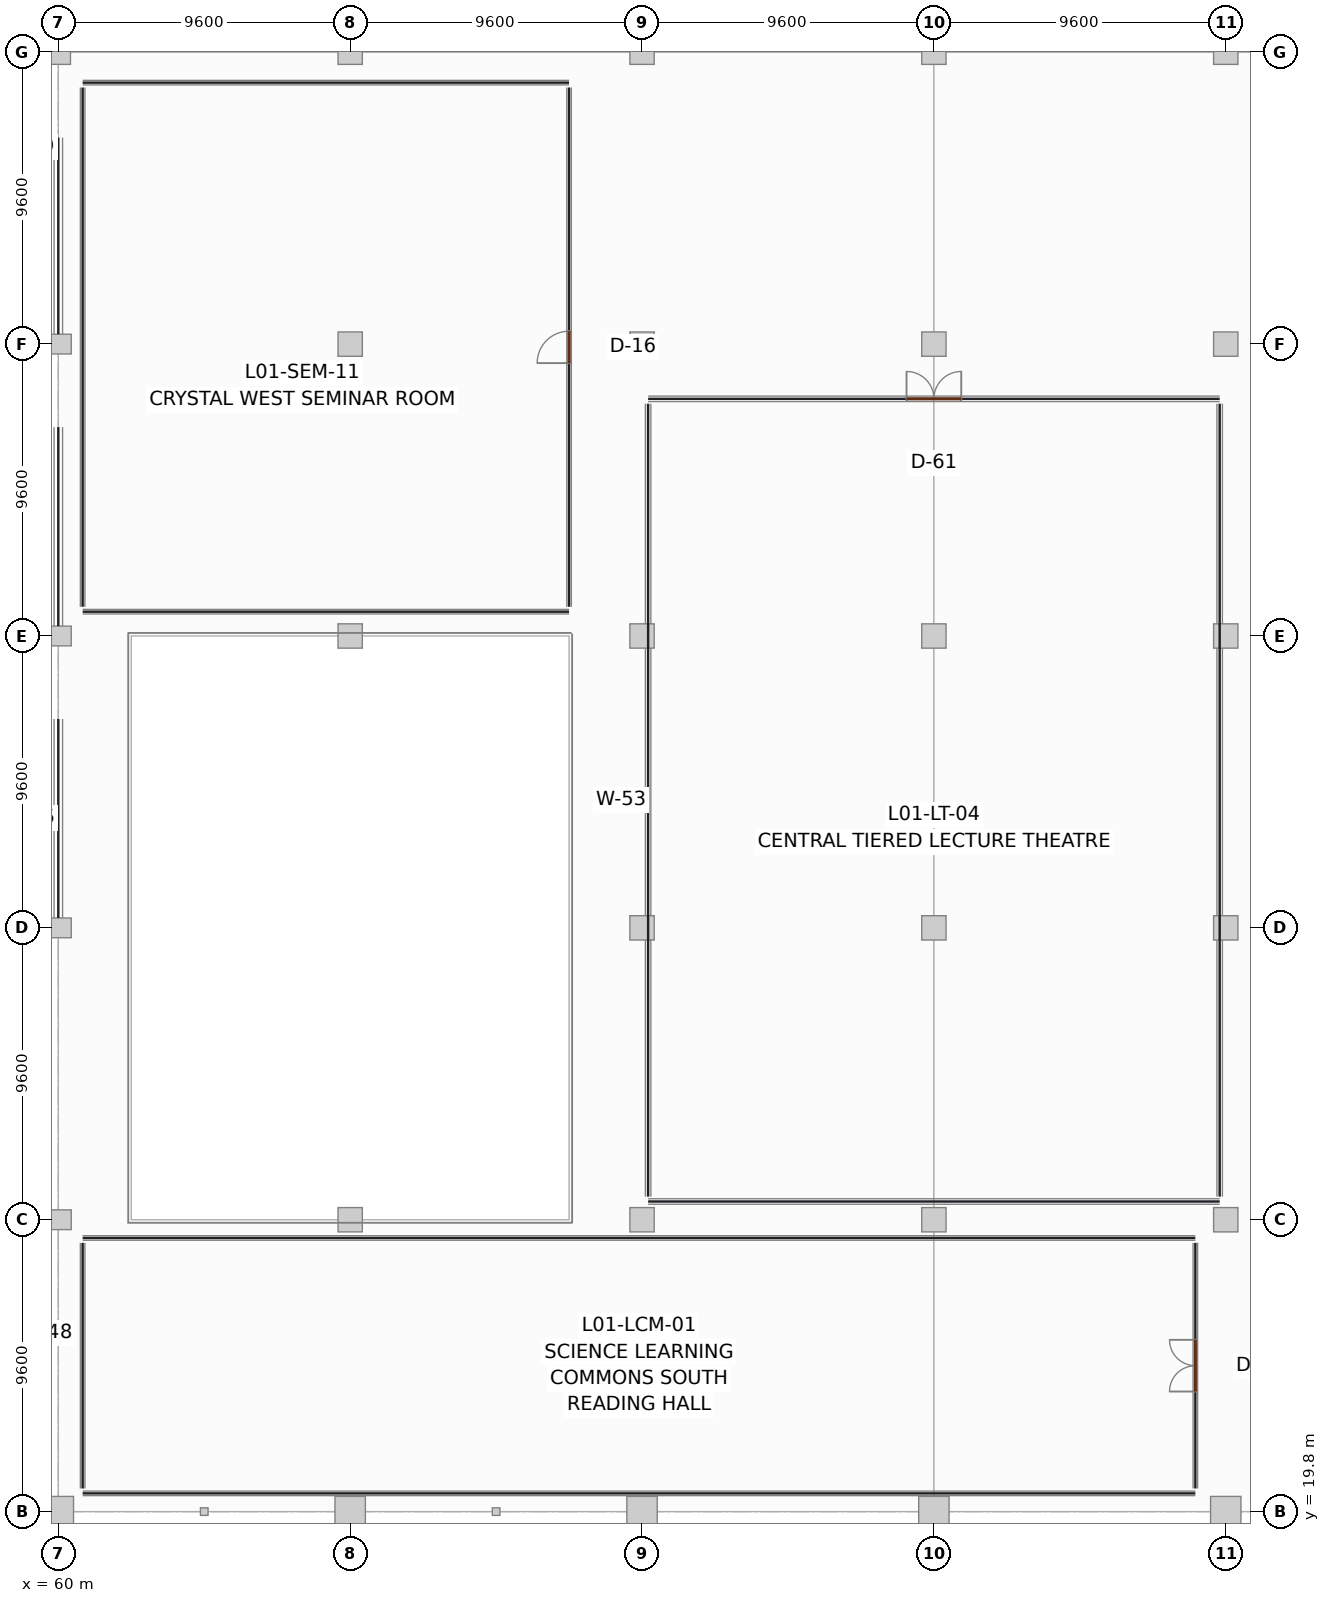
"""IFC4 building model, lengths in metres.
Left out: names, types, materials, properties, quantities, classifications, styles, units other than length and angle.
Written with IfcOpenShell. Run it as: python <this file> out.ifc"""

import sys

from ifc_helpers import new_model, si_unit, direction, frame, frame_2d, origin, origin_2d, place, context, subcontext, project, spatial, rectangle, hollow_rectangle, extrude, element, fill, save


model = new_model("IFC4")
c1 = context("Model", 3, precision=1e-05, world=origin(), true_north=direction((0.0, 1.0)))
c2 = subcontext(c1, "Body", "Model", "MODEL_VIEW")
j1 = project(units=[si_unit("LENGTHUNIT", "METRE"), si_unit("PLANEANGLEUNIT", "RADIAN")], contexts=[c1])
p1 = place(None, origin())
s1 = spatial("IfcSite", under=j1, at=p1, CompositionType="ELEMENT")
p2 = place(p1, origin())
s2 = spatial("IfcBuilding", under=s1, at=p2, CompositionType="ELEMENT")
p3 = place(p2, frame((0.0, 0.0, 5.4)))
s3 = spatial("IfcBuildingStorey", under=s2, at=p3, CompositionType="ELEMENT", Elevation=5.4)
p4 = place(p3, frame((60.0, 19.8, 0.0), z_axis=(0.0, 0.0, 1.0), x_axis=(1.0, 0.0, 0.0)))
e1 = element("IfcColumn", 1, at=p4, inside=s3, PredefinedType="COLUMN", context=c2, shape_type="SweptSolid", body=[
    extrude(rectangle(XDim=1.0, YDim=1.0, at=origin_2d()), origin(), (0.0, 0.0, 1.0), 4.18),
])
for number, where, z_axis, x_axis in (
    (2, (60.0, 29.4, 0.0), (0.0, 0.0, 1.0), (1.0, 0.0, 0.0)),
    (3, (60.0, 39.0, 0.0), (0.0, 0.0, 1.0), (1.0, 0.0, 0.0)),
    (4, (60.0, 48.6, 0.0), (0.0, 0.0, 1.0), (1.0, 0.0, 0.0)),
    (5, (60.0, 58.2, 0.0), (0.0, 0.0, 1.0), (1.0, 0.0, 0.0)),
):
    element("IfcColumn", number, at=place(p3, frame(where, z_axis=z_axis, x_axis=x_axis)), inside=s3, PredefinedType="COLUMN", context=c2, shape_type="SweptSolid", body=[
        extrude(rectangle(XDim=0.85, YDim=0.65, at=origin_2d()), origin(), (0.0, 0.0, 1.0), 4.18),
    ])
p5 = place(p3, frame((60.0, 67.8, 0.0), z_axis=(0.0, 0.0, 1.0), x_axis=(1.0, 0.0, 0.0)))
e6 = element("IfcColumn", 6, at=p5, inside=s3, PredefinedType="COLUMN", context=c2, shape_type="SweptSolid", body=[
    extrude(rectangle(XDim=0.8, YDim=0.8, at=origin_2d()), origin(), (0.0, 0.0, 1.0), 4.18),
])
p6 = place(p3, frame((69.6, 19.8, 0.0), z_axis=(0.0, 0.0, 1.0), x_axis=(1.0, 0.0, 0.0)))
e7 = element("IfcColumn", 7, at=p6, inside=s3, PredefinedType="COLUMN", context=c2, shape_type="SweptSolid", body=[
    extrude(rectangle(XDim=1.0, YDim=1.0, at=origin_2d()), origin(), (0.0, 0.0, 1.0), 4.18),
])
for number, where, z_axis, x_axis in (
    (8, (69.6, 29.4, 0.0), (0.0, 0.0, 1.0), (1.0, 0.0, 0.0)),
    (9, (69.6, 48.6, 0.0), (0.0, 0.0, 1.0), (1.0, 0.0, 0.0)),
    (10, (69.6, 58.2, 0.0), (0.0, 0.0, 1.0), (1.0, 0.0, 0.0)),
    (11, (69.6, 67.8, 0.0), (0.0, 0.0, 1.0), (1.0, 0.0, 0.0)),
):
    element("IfcColumn", number, at=place(p3, frame(where, z_axis=z_axis, x_axis=x_axis)), inside=s3, PredefinedType="COLUMN", context=c2, shape_type="SweptSolid", body=[
        extrude(rectangle(XDim=0.8, YDim=0.8, at=origin_2d()), origin(), (0.0, 0.0, 1.0), 4.18),
    ])
p7 = place(p3, frame((79.2, 19.8, 0.0), z_axis=(0.0, 0.0, 1.0), x_axis=(1.0, 0.0, 0.0)))
e12 = element("IfcColumn", 12, at=p7, inside=s3, PredefinedType="COLUMN", context=c2, shape_type="SweptSolid", body=[
    extrude(rectangle(XDim=1.0, YDim=1.0, at=origin_2d()), origin(), (0.0, 0.0, 1.0), 4.18),
])
for number, where, z_axis, x_axis in (
    (13, (79.2, 29.4, 0.0), (0.0, 0.0, 1.0), (1.0, 0.0, 0.0)),
    (14, (79.2, 39.0, 0.0), (0.0, 0.0, 1.0), (1.0, 0.0, 0.0)),
    (15, (79.2, 48.6, 0.0), (0.0, 0.0, 1.0), (1.0, 0.0, 0.0)),
    (16, (79.2, 58.2, 0.0), (0.0, 0.0, 1.0), (1.0, 0.0, 0.0)),
    (17, (79.2, 67.8, 0.0), (0.0, 0.0, 1.0), (1.0, 0.0, 0.0)),
):
    element("IfcColumn", number, at=place(p3, frame(where, z_axis=z_axis, x_axis=x_axis)), inside=s3, PredefinedType="COLUMN", context=c2, shape_type="SweptSolid", body=[
        extrude(rectangle(XDim=0.8, YDim=0.8, at=origin_2d()), origin(), (0.0, 0.0, 1.0), 4.18),
    ])
p8 = place(p3, frame((88.8, 19.8, 0.0), z_axis=(0.0, 0.0, 1.0), x_axis=(1.0, 0.0, 0.0)))
e18 = element("IfcColumn", 18, at=p8, inside=s3, PredefinedType="COLUMN", context=c2, shape_type="SweptSolid", body=[
    extrude(rectangle(XDim=1.0, YDim=1.0, at=origin_2d()), origin(), (0.0, 0.0, 1.0), 4.18),
])
for number, where, z_axis, x_axis in (
    (19, (88.8, 29.4, 0.0), (0.0, 0.0, 1.0), (1.0, 0.0, 0.0)),
    (20, (88.8, 39.0, 0.0), (0.0, 0.0, 1.0), (1.0, 0.0, 0.0)),
    (21, (88.8, 48.6, 0.0), (0.0, 0.0, 1.0), (1.0, 0.0, 0.0)),
    (22, (88.8, 58.2, 0.0), (0.0, 0.0, 1.0), (1.0, 0.0, 0.0)),
    (23, (88.8, 67.8, 0.0), (0.0, 0.0, 1.0), (1.0, 0.0, 0.0)),
):
    element("IfcColumn", number, at=place(p3, frame(where, z_axis=z_axis, x_axis=x_axis)), inside=s3, PredefinedType="COLUMN", context=c2, shape_type="SweptSolid", body=[
        extrude(rectangle(XDim=0.8, YDim=0.8, at=origin_2d()), origin(), (0.0, 0.0, 1.0), 4.18),
    ])
p9 = place(p3, frame((98.4, 19.8, 0.0), z_axis=(0.0, 0.0, 1.0), x_axis=(1.0, 0.0, 0.0)))
e24 = element("IfcColumn", 24, at=p9, inside=s3, PredefinedType="COLUMN", context=c2, shape_type="SweptSolid", body=[
    extrude(rectangle(XDim=1.0, YDim=1.0, at=origin_2d()), origin(), (0.0, 0.0, 1.0), 4.18),
])
for number, where, z_axis, x_axis in (
    (25, (98.4, 29.4, 0.0), (0.0, 0.0, 1.0), (1.0, 0.0, 0.0)),
    (26, (98.4, 39.0, 0.0), (0.0, 0.0, 1.0), (1.0, 0.0, 0.0)),
    (27, (98.4, 48.6, 0.0), (0.0, 0.0, 1.0), (1.0, 0.0, 0.0)),
    (28, (98.4, 58.2, 0.0), (0.0, 0.0, 1.0), (1.0, 0.0, 0.0)),
    (29, (98.4, 67.8, 0.0), (0.0, 0.0, 1.0), (1.0, 0.0, 0.0)),
):
    element("IfcColumn", number, at=place(p3, frame(where, z_axis=z_axis, x_axis=x_axis)), inside=s3, PredefinedType="COLUMN", context=c2, shape_type="SweptSolid", body=[
        extrude(rectangle(XDim=0.8, YDim=0.8, at=origin_2d()), origin(), (0.0, 0.0, 1.0), 4.18),
    ])
for number, where, z_axis, x_axis in (
    (30, (64.8, 19.8, 0.0), (0.0, 0.0, 1.0), (1.0, 0.0, 0.0)),
    (31, (74.4, 19.8, 0.0), (0.0, 0.0, 1.0), (1.0, 0.0, 0.0)),
):
    element("IfcColumn", number, at=place(p3, frame(where, z_axis=z_axis, x_axis=x_axis)), inside=s3, PredefinedType="COLUMN", context=c2, shape_type="SweptSolid", body=[
        extrude(hollow_rectangle(XDim=0.25, YDim=0.25, WallThickness=0.012, at=origin_2d()), origin(), (0.0, 0.0, 1.0), 4.18),
    ])
for number, where, z_axis, x_axis in (
    (32, (60.0, 39.327, 0.0), (0.0, 0.0, 1.0), (0.0, 1.0, 0.0)),
    (33, (60.0, 48.927, 0.0), (0.0, 0.0, 1.0), (0.0, 1.0, 0.0)),
):
    element("IfcWall", number, at=place(p3, frame(where, z_axis=z_axis, x_axis=x_axis)), inside=s3, PredefinedType="SOLIDWALL", context=c2, shape_type="SweptSolid", body=[
        extrude(rectangle(XDim=6.542, YDim=0.28, at=frame_2d((3.271, 0.0))), origin(), (0.0, 0.0, 1.0), 3.38),
    ])
p10 = place(p3, frame((60.0, 58.527, 0.0), z_axis=(0.0, 0.0, 1.0), x_axis=(0.0, 1.0, 0.0)))
e34 = element("IfcWall", 34, at=p10, inside=s3, PredefinedType="SOLIDWALL", context=c2, shape_type="SweptSolid", body=[
    extrude(rectangle(XDim=6.467, YDim=0.28, at=frame_2d((3.233, 0.0))), origin(), (0.0, 0.0, 1.0), 3.38),
])
for number, where, z_axis, x_axis in (
    (35, (60.8, 20.4, 0.0), (0.0, 0.0, 1.0), (1.0, 0.0, 0.0)),
    (36, (60.8, 28.8, 0.0), (0.0, 0.0, 1.0), (1.0, 0.0, 0.0)),
):
    element("IfcWall", number, at=place(p3, frame(where, z_axis=z_axis, x_axis=x_axis)), inside=s3, PredefinedType="PARTITIONING", context=c2, shape_type="SweptSolid", body=[
        extrude(rectangle(XDim=36.6, YDim=0.15, at=frame_2d((18.3, 0.0))), origin(), (0.0, 0.0, 1.0), 3.22),
    ])
p11 = place(p3, frame((60.8, 20.56, 0.0), z_axis=(0.0, 0.0, 1.0), x_axis=(0.0, 1.0, 0.0)))
e37 = element("IfcWall", 37, at=p11, inside=s3, PredefinedType="PARTITIONING", context=c2, shape_type="SweptSolid", body=[
    extrude(rectangle(XDim=8.08, YDim=0.15, at=frame_2d((4.04, 0.0))), origin(), (0.0, 0.0, 1.0), 3.22),
])
p12 = place(p3, frame((97.4, 20.56, 0.0), z_axis=(0.0, 0.0, 1.0), x_axis=(0.0, 1.0, 0.0)))
e38 = element("IfcWall", 38, at=p12, inside=s3, PredefinedType="PARTITIONING", context=c2, shape_type="SweptSolid", body=[
    extrude(rectangle(XDim=8.08, YDim=0.15, at=frame_2d((4.04, 0.0))), origin(), (0.0, 0.0, 1.0), 3.22),
])
p13 = place(p12, frame((3.19, 0.0, 0.0)))
e39 = element("IfcOpeningElement", 39, at=p13, cuts=e38, PredefinedType="OPENING", context=c2, shape_type="SweptSolid", body=[
    extrude(rectangle(XDim=1.7, YDim=2.3, at=frame_2d((0.85, 1.15))), frame((0.0, 0.085, 0.0), z_axis=(0.0, -1.0, 0.0), x_axis=(1.0, 0.0, 0.0)), (0.0, 0.0, 1.0), 0.17),
])
p14 = place(p3, frame((79.4, 30.0, 0.0), z_axis=(0.0, 0.0, 1.0), x_axis=(1.0, 0.0, 0.0)))
e40 = element("IfcWall", 40, at=p14, inside=s3, PredefinedType="PARTITIONING", context=c2, shape_type="SweptSolid", body=[
    extrude(rectangle(XDim=18.8, YDim=0.18, at=frame_2d((9.4, 0.0))), origin(), (0.0, 0.0, 1.0), 3.22),
])
p15 = place(p3, frame((79.4, 56.4, 0.0), z_axis=(0.0, 0.0, 1.0), x_axis=(1.0, 0.0, 0.0)))
e41 = element("IfcWall", 41, at=p15, inside=s3, PredefinedType="PARTITIONING", context=c2, shape_type="SweptSolid", body=[
    extrude(rectangle(XDim=18.8, YDim=0.18, at=frame_2d((9.4, 0.0))), origin(), (0.0, 0.0, 1.0), 3.22),
])
p16 = place(p15, frame((8.5, 0.0, 0.0)))
e42 = element("IfcOpeningElement", 42, at=p16, cuts=e41, PredefinedType="OPENING", context=c2, shape_type="SweptSolid", body=[
    extrude(rectangle(XDim=1.8, YDim=2.4, at=frame_2d((0.9, 1.2))), frame((0.0, 0.1, 0.0), z_axis=(0.0, -1.0, 0.0), x_axis=(1.0, 0.0, 0.0)), (0.0, 0.0, 1.0), 0.2),
])
for number, where, z_axis, x_axis in (
    (43, (79.4, 30.16, 0.0), (0.0, 0.0, 1.0), (0.0, 1.0, 0.0)),
    (44, (98.2, 30.16, 0.0), (0.0, 0.0, 1.0), (0.0, 1.0, 0.0)),
):
    element("IfcWall", number, at=place(p3, frame(where, z_axis=z_axis, x_axis=x_axis)), inside=s3, PredefinedType="PARTITIONING", context=c2, shape_type="SweptSolid", body=[
        extrude(rectangle(XDim=26.08, YDim=0.18, at=frame_2d((13.04, 0.0))), origin(), (0.0, 0.0, 1.0), 3.22),
    ])
for number, where, z_axis, x_axis in (
    (45, (60.8, 49.4, 0.0), (0.0, 0.0, 1.0), (1.0, 0.0, 0.0)),
    (46, (60.8, 66.8, 0.0), (0.0, 0.0, 1.0), (1.0, 0.0, 0.0)),
):
    element("IfcWall", number, at=place(p3, frame(where, z_axis=z_axis, x_axis=x_axis)), inside=s3, PredefinedType="PARTITIONING", context=c2, shape_type="SweptSolid", body=[
        extrude(rectangle(XDim=16.0, YDim=0.15, at=frame_2d((8.0, 0.0))), origin(), (0.0, 0.0, 1.0), 3.22),
    ])
p17 = place(p3, frame((60.8, 49.56, 0.0), z_axis=(0.0, 0.0, 1.0), x_axis=(0.0, 1.0, 0.0)))
e47 = element("IfcWall", 47, at=p17, inside=s3, PredefinedType="PARTITIONING", context=c2, shape_type="SweptSolid", body=[
    extrude(rectangle(XDim=17.08, YDim=0.15, at=frame_2d((8.54, 0.0))), origin(), (0.0, 0.0, 1.0), 3.22),
])
p18 = place(p3, frame((76.8, 49.56, 0.0), z_axis=(0.0, 0.0, 1.0), x_axis=(0.0, 1.0, 0.0)))
e48 = element("IfcWall", 48, at=p18, inside=s3, PredefinedType="PARTITIONING", context=c2, shape_type="SweptSolid", body=[
    extrude(rectangle(XDim=17.08, YDim=0.15, at=frame_2d((8.54, 0.0))), origin(), (0.0, 0.0, 1.0), 3.22),
])
p19 = place(p18, frame((8.015, 0.0, 0.0)))
e49 = element("IfcOpeningElement", 49, at=p19, cuts=e48, PredefinedType="OPENING", context=c2, shape_type="SweptSolid", body=[
    extrude(rectangle(XDim=1.05, YDim=2.2, at=frame_2d((0.525, 1.1))), frame((0.0, 0.085, 0.0), z_axis=(0.0, -1.0, 0.0), x_axis=(1.0, 0.0, 0.0)), (0.0, 0.0, 1.0), 0.17),
])
p20 = place(p13, origin())
e50 = element("IfcDoor", 50, at=p20, inside=s3, OperationType="DOUBLE_DOOR_SINGLE_SWING", PredefinedType="DOOR", context=c2, shape_type="SweptSolid", body=[
    extrude(rectangle(XDim=1.7, YDim=2.3, at=frame_2d((0.85, 1.15))), frame((0.0, 0.025, 0.0), z_axis=(0.0, -1.0, 0.0), x_axis=(1.0, 0.0, 0.0)), (0.0, 0.0, 1.0), 0.05),
])
fill(e39, e50)
p21 = place(p16, origin())
e51 = element("IfcDoor", 51, at=p21, inside=s3, OperationType="DOUBLE_DOOR_SINGLE_SWING", PredefinedType="DOOR", context=c2, shape_type="SweptSolid", body=[
    extrude(rectangle(XDim=1.8, YDim=2.4, at=frame_2d((0.9, 1.2))), frame((0.0, 0.025, 0.0), z_axis=(0.0, -1.0, 0.0), x_axis=(1.0, 0.0, 0.0)), (0.0, 0.0, 1.0), 0.05),
])
fill(e42, e51)
p22 = place(p19, origin())
e52 = element("IfcDoor", 52, at=p22, inside=s3, OperationType="SINGLE_SWING_LEFT", PredefinedType="DOOR", context=c2, shape_type="SweptSolid", body=[
    extrude(rectangle(XDim=1.05, YDim=2.2, at=frame_2d((0.525, 1.1))), frame((0.0, 0.025, 0.0), z_axis=(0.0, -1.0, 0.0), x_axis=(1.0, 0.0, 0.0)), (0.0, 0.0, 1.0), 0.05),
])
fill(e49, e52)
save(model, sys.argv[1])
